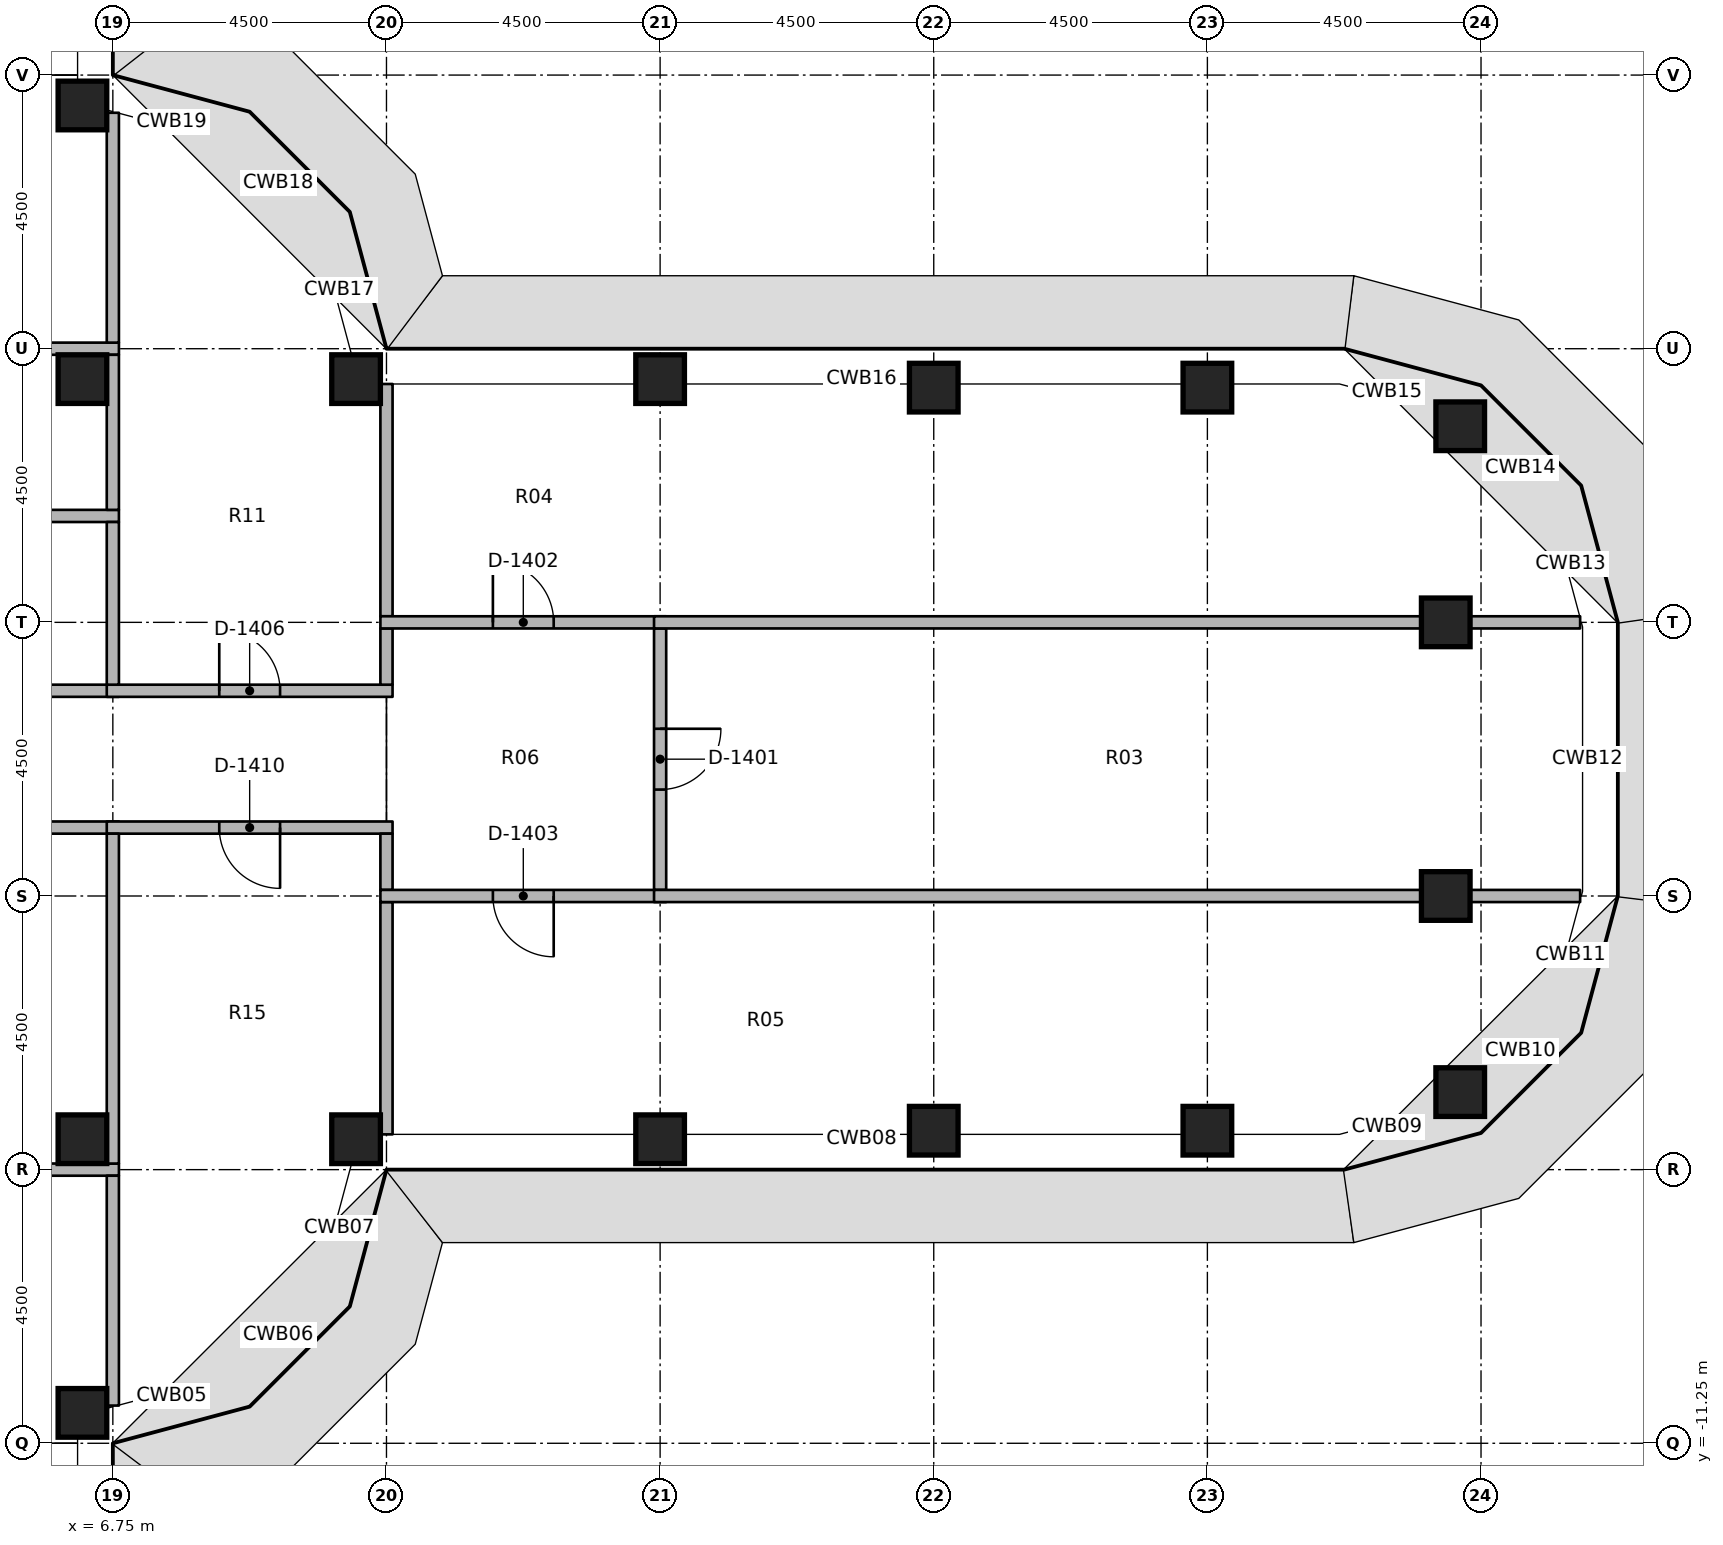
"""IFC4 building model, lengths in metres.
Left out: names, types, materials, properties, quantities, classifications, styles, units other than length and angle.
Written with IfcOpenShell. Run it as: python <this file> out.ifc"""

import sys

from ifc_helpers import new_model, si_unit, direction, frame, frame_2d, origin, origin_2d, place, context, subcontext, project, spatial, rectangle, extrude, element, fill, save


model = new_model("IFC4")
c1 = context("Model", 3, precision=1e-05, world=origin(), true_north=direction((0.0, 1.0)))
c2 = subcontext(c1, "Body", "Model", "MODEL_VIEW")
j1 = project(units=[si_unit("LENGTHUNIT", "METRE"), si_unit("PLANEANGLEUNIT", "RADIAN")], contexts=[c1])
p1 = place(None, origin())
s1 = spatial("IfcSite", under=j1, at=p1, CompositionType="ELEMENT")
p2 = place(p1, origin())
s2 = spatial("IfcBuilding", under=s1, at=p2, CompositionType="ELEMENT")
p3 = place(p2, frame((0.0, 0.0, 141.0)))
s3 = spatial("IfcBuildingStorey", under=s2, at=p3, CompositionType="ELEMENT", Elevation=141.0)
for number, where, z_axis, x_axis in (
    (1, (6.25, -10.75, 0.0), (0.0, 0.0, 1.0), (1.0, 0.0, 0.0)),
    (2, (6.25, -6.25, 0.0), (0.0, 0.0, 1.0), (1.0, 0.0, 0.0)),
    (3, (6.25, 6.25, 0.0), (0.0, 0.0, 1.0), (1.0, 0.0, 0.0)),
    (4, (6.25, 10.75, 0.0), (0.0, 0.0, 1.0), (1.0, 0.0, 0.0)),
    (5, (10.75, -6.25, 0.0), (0.0, 0.0, 1.0), (1.0, 0.0, 0.0)),
    (6, (10.75, 6.25, 0.0), (0.0, 0.0, 1.0), (1.0, 0.0, 0.0)),
    (7, (15.75, -6.25, 0.0), (0.0, 0.0, 1.0), (1.0, 0.0, 0.0)),
    (8, (15.75, 6.25, 0.0), (0.0, 0.0, 1.0), (1.0, 0.0, 0.0)),
    (9, (20.25, -6.11, 0.0), (0.0, 0.0, 1.0), (1.0, 0.0, 0.0)),
    (10, (20.25, 6.11, 0.0), (0.0, 0.0, 1.0), (1.0, 0.0, 0.0)),
    (11, (24.75, -6.11, 0.0), (0.0, 0.0, 1.0), (1.0, 0.0, 0.0)),
    (12, (24.75, 6.11, 0.0), (0.0, 0.0, 1.0), (1.0, 0.0, 0.0)),
    (13, (28.908, -5.475, 0.0), (0.0, 0.0, 1.0), (1.0, 0.0, 0.0)),
    (14, (28.67, -2.25, 0.0), (0.0, 0.0, 1.0), (1.0, 0.0, 0.0)),
    (15, (28.67, 2.25, 0.0), (0.0, 0.0, 1.0), (1.0, 0.0, 0.0)),
    (16, (28.908, 5.475, 0.0), (0.0, 0.0, 1.0), (1.0, 0.0, 0.0)),
):
    element("IfcColumn", number, at=place(p3, frame(where, z_axis=z_axis, x_axis=x_axis)), inside=s3, PredefinedType="COLUMN", context=c2, shape_type="SweptSolid", body=[
        extrude(rectangle(XDim=0.8, YDim=0.8, at=origin_2d()), origin(), (0.0, 0.0, 1.0), 3.65),
    ])
p4 = place(p3, frame((1.025, 1.125, 0.0), z_axis=(0.0, 0.0, 1.0), x_axis=(1.0, 0.0, 0.0)))
e17 = element("IfcWall", 17, at=p4, inside=s3, PredefinedType="PARTITIONING", context=c2, shape_type="SweptSolid", body=[
    extrude(rectangle(XDim=5.825, YDim=0.2, at=frame_2d((2.913, 0.0))), origin(), (0.0, 0.0, 1.0), 2.75),
])
p5 = place(p4, frame((2.462, 0.0, 0.0)))
e18 = element("IfcOpeningElement", 18, at=p5, cuts=e17, PredefinedType="OPENING", context=c2, shape_type="SweptSolid", body=[
    extrude(rectangle(XDim=0.9, YDim=2.1, at=frame_2d((0.45, 1.05))), frame((0.0, 0.11, 0.0), z_axis=(0.0, -1.0, 0.0), x_axis=(1.0, 0.0, 0.0)), (0.0, 0.0, 1.0), 0.22),
])
p6 = place(p3, frame((6.65, 1.125, 0.0), z_axis=(0.0, 0.0, 1.0), x_axis=(1.0, 0.0, 0.0)))
e19 = element("IfcWall", 19, at=p6, inside=s3, PredefinedType="PARTITIONING", context=c2, shape_type="SweptSolid", body=[
    extrude(rectangle(XDim=4.7, YDim=0.2, at=frame_2d((2.35, 0.0))), origin(), (0.0, 0.0, 1.0), 2.75),
])
p7 = place(p6, frame((1.85, 0.0, 0.0)))
e20 = element("IfcOpeningElement", 20, at=p7, cuts=e19, PredefinedType="OPENING", context=c2, shape_type="SweptSolid", body=[
    extrude(rectangle(XDim=1.0, YDim=2.1, at=frame_2d((0.5, 1.05))), frame((0.0, 0.11, 0.0), z_axis=(0.0, -1.0, 0.0), x_axis=(1.0, 0.0, 0.0)), (0.0, 0.0, 1.0), 0.22),
])
p8 = place(p3, frame((6.85, -1.125, 0.0), z_axis=(0.0, 0.0, 1.0), x_axis=(-1.0, 0.0, 0.0)))
e21 = element("IfcWall", 21, at=p8, inside=s3, PredefinedType="PARTITIONING", context=c2, shape_type="SweptSolid", body=[
    extrude(rectangle(XDim=5.825, YDim=0.2, at=frame_2d((2.913, 0.0))), origin(), (0.0, 0.0, 1.0), 2.75),
])
p9 = place(p8, frame((2.413, 0.0, 0.0)))
e22 = element("IfcOpeningElement", 22, at=p9, cuts=e21, PredefinedType="OPENING", context=c2, shape_type="SweptSolid", body=[
    extrude(rectangle(XDim=1.0, YDim=2.1, at=frame_2d((0.5, 1.05))), frame((0.0, 0.11, 0.0), z_axis=(0.0, -1.0, 0.0), x_axis=(1.0, 0.0, 0.0)), (0.0, 0.0, 1.0), 0.22),
])
p10 = place(p3, frame((11.35, -1.125, 0.0), z_axis=(0.0, 0.0, 1.0), x_axis=(-1.0, 0.0, 0.0)))
e23 = element("IfcWall", 23, at=p10, inside=s3, PredefinedType="PARTITIONING", context=c2, shape_type="SweptSolid", body=[
    extrude(rectangle(XDim=4.7, YDim=0.2, at=frame_2d((2.35, 0.0))), origin(), (0.0, 0.0, 1.0), 2.75),
])
p11 = place(p10, frame((1.85, 0.0, 0.0)))
e24 = element("IfcOpeningElement", 24, at=p11, cuts=e23, PredefinedType="OPENING", context=c2, shape_type="SweptSolid", body=[
    extrude(rectangle(XDim=1.0, YDim=2.1, at=frame_2d((0.5, 1.05))), frame((0.0, 0.11, 0.0), z_axis=(0.0, -1.0, 0.0), x_axis=(1.0, 0.0, 0.0)), (0.0, 0.0, 1.0), 0.22),
])
p12 = place(p3, frame((1.025, 6.75, 0.0), z_axis=(0.0, 0.0, 1.0), x_axis=(1.0, 0.0, 0.0)))
e25 = element("IfcWall", 25, at=p12, inside=s3, PredefinedType="PARTITIONING", context=c2, shape_type="SweptSolid", body=[
    extrude(rectangle(XDim=5.825, YDim=0.2, at=frame_2d((2.913, 0.0))), origin(), (0.0, 0.0, 1.0), 2.75),
])
p13 = place(p3, frame((6.75, 6.85, 0.0), z_axis=(0.0, 0.0, 1.0), x_axis=(0.0, 1.0, 0.0)))
e26 = element("IfcWall", 26, at=p13, inside=s3, PredefinedType="PARTITIONING", context=c2, shape_type="SweptSolid", body=[
    extrude(rectangle(XDim=3.78, YDim=0.2, at=frame_2d((1.89, 0.0))), origin(), (0.0, 0.0, 1.0), 2.75),
])
p14 = place(p3, frame((1.025, -6.75, 0.0), z_axis=(0.0, 0.0, 1.0), x_axis=(1.0, 0.0, 0.0)))
e27 = element("IfcWall", 27, at=p14, inside=s3, PredefinedType="PARTITIONING", context=c2, shape_type="SweptSolid", body=[
    extrude(rectangle(XDim=5.825, YDim=0.2, at=frame_2d((2.913, 0.0))), origin(), (0.0, 0.0, 1.0), 2.75),
])
p15 = place(p3, frame((6.75, -10.63, 0.0), z_axis=(0.0, 0.0, 1.0), x_axis=(0.0, 1.0, 0.0)))
e28 = element("IfcWall", 28, at=p15, inside=s3, PredefinedType="PARTITIONING", context=c2, shape_type="SweptSolid", body=[
    extrude(rectangle(XDim=3.78, YDim=0.2, at=frame_2d((1.89, 0.0))), origin(), (0.0, 0.0, 1.0), 2.75),
])
p16 = place(p3, frame((1.025, 4.0, 0.0), z_axis=(0.0, 0.0, 1.0), x_axis=(1.0, 0.0, 0.0)))
e29 = element("IfcWall", 29, at=p16, inside=s3, PredefinedType="PARTITIONING", context=c2, shape_type="SweptSolid", body=[
    extrude(rectangle(XDim=5.825, YDim=0.2, at=frame_2d((2.913, 0.0))), origin(), (0.0, 0.0, 1.0), 2.75),
])
p17 = place(p3, frame((6.75, 1.225, 0.0), z_axis=(0.0, 0.0, 1.0), x_axis=(0.0, 1.0, 0.0)))
e30 = element("IfcWall", 30, at=p17, inside=s3, PredefinedType="PARTITIONING", context=c2, shape_type="SweptSolid", body=[
    extrude(rectangle(XDim=2.675, YDim=0.2, at=frame_2d((1.337, 0.0))), origin(), (0.0, 0.0, 1.0), 2.75),
])
p18 = place(p3, frame((6.75, 4.1, 0.0), z_axis=(0.0, 0.0, 1.0), x_axis=(0.0, 1.0, 0.0)))
e31 = element("IfcWall", 31, at=p18, inside=s3, PredefinedType="PARTITIONING", context=c2, shape_type="SweptSolid", body=[
    extrude(rectangle(XDim=2.55, YDim=0.2, at=frame_2d((1.275, 0.0))), origin(), (0.0, 0.0, 1.0), 2.75),
])
p19 = place(p3, frame((11.25, 1.225, 0.0), z_axis=(0.0, 0.0, 1.0), x_axis=(0.0, 1.0, 0.0)))
e32 = element("IfcWall", 32, at=p19, inside=s3, PredefinedType="PARTITIONING", context=c2, shape_type="SweptSolid", body=[
    extrude(rectangle(XDim=0.925, YDim=0.2, at=frame_2d((0.462, 0.0))), origin(), (0.0, 0.0, 1.0), 2.75),
])
p20 = place(p3, frame((11.25, 2.35, 0.0), z_axis=(0.0, 0.0, 1.0), x_axis=(0.0, 1.0, 0.0)))
e33 = element("IfcWall", 33, at=p20, inside=s3, PredefinedType="PARTITIONING", context=c2, shape_type="SweptSolid", body=[
    extrude(rectangle(XDim=3.82, YDim=0.2, at=frame_2d((1.91, 0.0))), origin(), (0.0, 0.0, 1.0), 2.75),
])
p21 = place(p3, frame((6.75, -6.65, 0.0), z_axis=(0.0, 0.0, 1.0), x_axis=(0.0, 1.0, 0.0)))
e34 = element("IfcWall", 34, at=p21, inside=s3, PredefinedType="PARTITIONING", context=c2, shape_type="SweptSolid", body=[
    extrude(rectangle(XDim=5.425, YDim=0.2, at=frame_2d((2.712, 0.0))), origin(), (0.0, 0.0, 1.0), 2.75),
])
p22 = place(p3, frame((11.25, -2.15, 0.0), z_axis=(0.0, 0.0, 1.0), x_axis=(0.0, 1.0, 0.0)))
e35 = element("IfcWall", 35, at=p22, inside=s3, PredefinedType="PARTITIONING", context=c2, shape_type="SweptSolid", body=[
    extrude(rectangle(XDim=0.925, YDim=0.2, at=frame_2d((0.462, 0.0))), origin(), (0.0, 0.0, 1.0), 2.75),
])
p23 = place(p3, frame((11.25, -6.17, 0.0), z_axis=(0.0, 0.0, 1.0), x_axis=(0.0, 1.0, 0.0)))
e36 = element("IfcWall", 36, at=p23, inside=s3, PredefinedType="PARTITIONING", context=c2, shape_type="SweptSolid", body=[
    extrude(rectangle(XDim=3.82, YDim=0.2, at=frame_2d((1.91, 0.0))), origin(), (0.0, 0.0, 1.0), 2.75),
])
p24 = place(p3, frame((11.15, 2.25, 0.0), z_axis=(0.0, 0.0, 1.0), x_axis=(1.0, 0.0, 0.0)))
e37 = element("IfcWall", 37, at=p24, inside=s3, PredefinedType="PARTITIONING", context=c2, shape_type="SweptSolid", body=[
    extrude(rectangle(XDim=4.7, YDim=0.2, at=frame_2d((2.35, 0.0))), origin(), (0.0, 0.0, 1.0), 2.75),
])
p25 = place(p24, frame((1.85, 0.0, 0.0)))
e38 = element("IfcOpeningElement", 38, at=p25, cuts=e37, PredefinedType="OPENING", context=c2, shape_type="SweptSolid", body=[
    extrude(rectangle(XDim=1.0, YDim=2.1, at=frame_2d((0.5, 1.05))), frame((0.0, 0.11, 0.0), z_axis=(0.0, -1.0, 0.0), x_axis=(1.0, 0.0, 0.0)), (0.0, 0.0, 1.0), 0.22),
])
p26 = place(p3, frame((15.85, -2.25, 0.0), z_axis=(0.0, 0.0, 1.0), x_axis=(-1.0, 0.0, 0.0)))
e39 = element("IfcWall", 39, at=p26, inside=s3, PredefinedType="PARTITIONING", context=c2, shape_type="SweptSolid", body=[
    extrude(rectangle(XDim=4.7, YDim=0.2, at=frame_2d((2.35, 0.0))), origin(), (0.0, 0.0, 1.0), 2.75),
])
p27 = place(p26, frame((1.85, 0.0, 0.0)))
e40 = element("IfcOpeningElement", 40, at=p27, cuts=e39, PredefinedType="OPENING", context=c2, shape_type="SweptSolid", body=[
    extrude(rectangle(XDim=1.0, YDim=2.1, at=frame_2d((0.5, 1.05))), frame((0.0, 0.11, 0.0), z_axis=(0.0, -1.0, 0.0), x_axis=(1.0, 0.0, 0.0)), (0.0, 0.0, 1.0), 0.22),
])
p28 = place(p3, frame((15.75, 2.15, 0.0), z_axis=(0.0, 0.0, 1.0), x_axis=(0.0, -1.0, 0.0)))
e41 = element("IfcWall", 41, at=p28, inside=s3, PredefinedType="PARTITIONING", context=c2, shape_type="SweptSolid", body=[
    extrude(rectangle(XDim=4.3, YDim=0.2, at=frame_2d((2.15, 0.0))), origin(), (0.0, 0.0, 1.0), 2.75),
])
p29 = place(p28, frame((1.65, 0.0, 0.0)))
e42 = element("IfcOpeningElement", 42, at=p29, cuts=e41, PredefinedType="OPENING", context=c2, shape_type="SweptSolid", body=[
    extrude(rectangle(XDim=1.0, YDim=2.1, at=frame_2d((0.5, 1.05))), frame((0.0, 0.11, 0.0), z_axis=(0.0, -1.0, 0.0), x_axis=(1.0, 0.0, 0.0)), (0.0, 0.0, 1.0), 0.22),
])
p30 = place(p3, frame((15.65, 2.25, 0.0), z_axis=(0.0, 0.0, 1.0), x_axis=(1.0, 0.0, 0.0)))
e43 = element("IfcWall", 43, at=p30, inside=s3, PredefinedType="PARTITIONING", context=c2, shape_type="SweptSolid", body=[
    extrude(rectangle(XDim=12.62, YDim=0.2, at=frame_2d((6.31, 0.0))), origin(), (0.0, 0.0, 1.0), 2.75),
])
p31 = place(p3, frame((29.07, 2.25, 0.0), z_axis=(0.0, 0.0, 1.0), x_axis=(1.0, 0.0, 0.0)))
e44 = element("IfcWall", 44, at=p31, inside=s3, PredefinedType="PARTITIONING", context=c2, shape_type="SweptSolid", body=[
    extrude(rectangle(XDim=1.81, YDim=0.2, at=frame_2d((0.905, 0.0))), origin(), (0.0, 0.0, 1.0), 2.75),
])
p32 = place(p3, frame((15.65, -2.25, 0.0), z_axis=(0.0, 0.0, 1.0), x_axis=(1.0, 0.0, 0.0)))
e45 = element("IfcWall", 45, at=p32, inside=s3, PredefinedType="PARTITIONING", context=c2, shape_type="SweptSolid", body=[
    extrude(rectangle(XDim=12.62, YDim=0.2, at=frame_2d((6.31, 0.0))), origin(), (0.0, 0.0, 1.0), 2.75),
])
p33 = place(p3, frame((29.07, -2.25, 0.0), z_axis=(0.0, 0.0, 1.0), x_axis=(1.0, 0.0, 0.0)))
e46 = element("IfcWall", 46, at=p33, inside=s3, PredefinedType="PARTITIONING", context=c2, shape_type="SweptSolid", body=[
    extrude(rectangle(XDim=1.81, YDim=0.2, at=frame_2d((0.905, 0.0))), origin(), (0.0, 0.0, 1.0), 2.75),
])
p34 = place(p29, origin())
e47 = element("IfcDoor", 47, at=p34, inside=s3, OperationType="SINGLE_SWING_RIGHT", PredefinedType="DOOR", context=c2, shape_type="SweptSolid", body=[
    extrude(rectangle(XDim=1.0, YDim=2.1, at=frame_2d((0.5, 1.05))), frame((0.0, 0.025, 0.0), z_axis=(0.0, -1.0, 0.0), x_axis=(1.0, 0.0, 0.0)), (0.0, 0.0, 1.0), 0.05),
])
fill(e42, e47)
p35 = place(p25, origin())
e48 = element("IfcDoor", 48, at=p35, inside=s3, OperationType="SINGLE_SWING_RIGHT", PredefinedType="DOOR", context=c2, shape_type="SweptSolid", body=[
    extrude(rectangle(XDim=1.0, YDim=2.1, at=frame_2d((0.5, 1.05))), frame((0.0, 0.025, 0.0), z_axis=(0.0, -1.0, 0.0), x_axis=(1.0, 0.0, 0.0)), (0.0, 0.0, 1.0), 0.05),
])
fill(e38, e48)
p36 = place(p27, origin())
e49 = element("IfcDoor", 49, at=p36, inside=s3, OperationType="SINGLE_SWING_RIGHT", PredefinedType="DOOR", context=c2, shape_type="SweptSolid", body=[
    extrude(rectangle(XDim=1.0, YDim=2.1, at=frame_2d((0.5, 1.05))), frame((0.0, 0.025, 0.0), z_axis=(0.0, -1.0, 0.0), x_axis=(1.0, 0.0, 0.0)), (0.0, 0.0, 1.0), 0.05),
])
fill(e40, e49)
p37 = place(p7, origin())
e50 = element("IfcDoor", 50, at=p37, inside=s3, OperationType="SINGLE_SWING_RIGHT", PredefinedType="DOOR", context=c2, shape_type="SweptSolid", body=[
    extrude(rectangle(XDim=1.0, YDim=2.1, at=frame_2d((0.5, 1.05))), frame((0.0, 0.025, 0.0), z_axis=(0.0, -1.0, 0.0), x_axis=(1.0, 0.0, 0.0)), (0.0, 0.0, 1.0), 0.05),
])
fill(e20, e50)
p38 = place(p11, origin())
e51 = element("IfcDoor", 51, at=p38, inside=s3, OperationType="SINGLE_SWING_RIGHT", PredefinedType="DOOR", context=c2, shape_type="SweptSolid", body=[
    extrude(rectangle(XDim=1.0, YDim=2.1, at=frame_2d((0.5, 1.05))), frame((0.0, 0.025, 0.0), z_axis=(0.0, -1.0, 0.0), x_axis=(1.0, 0.0, 0.0)), (0.0, 0.0, 1.0), 0.05),
])
fill(e24, e51)
save(model, sys.argv[1])
